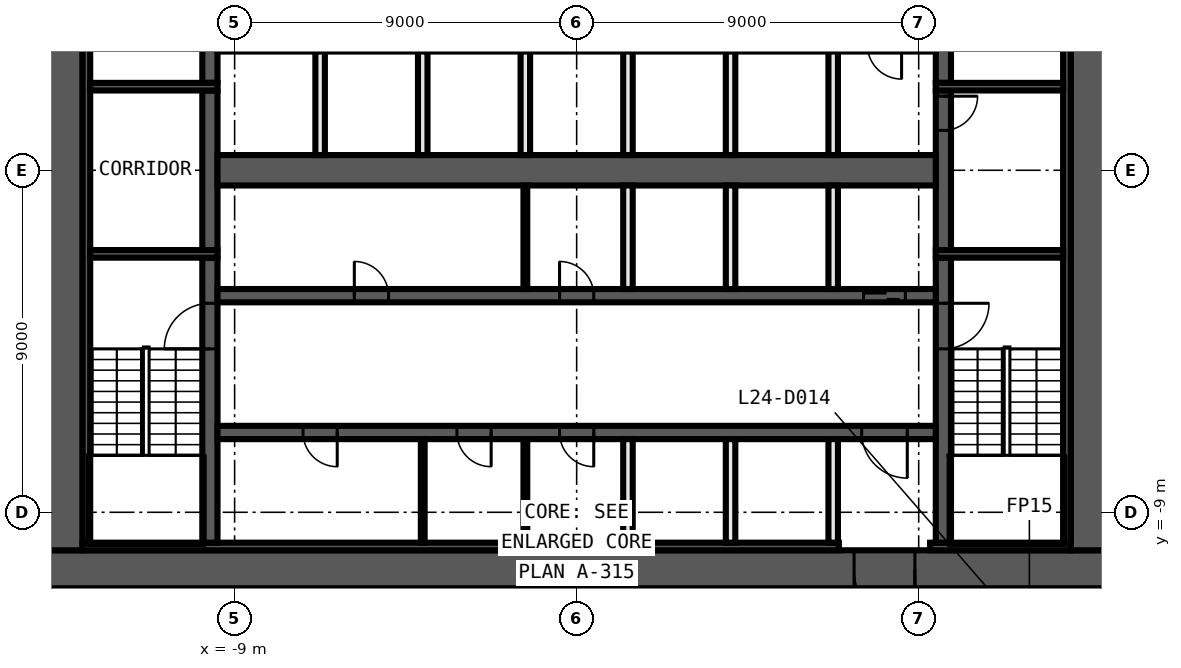
"""IFC4 building model, lengths in metres.
Left out: names, types, materials, properties, quantities, classifications, styles, units other than length and angle.
Written with IfcOpenShell. Run it as: python <this file> out.ifc"""

import sys

from ifc_helpers import new_model, si_unit, direction, frame, frame_2d, origin, place, context, subcontext, project, spatial, rectangle, extrude, element, fill, save


model = new_model("IFC4")
c1 = context("Model", 3, precision=1e-05, world=origin(), true_north=direction((0.0, 1.0)))
c2 = subcontext(c1, "Body", "Model", "MODEL_VIEW")
j1 = project(units=[si_unit("LENGTHUNIT", "METRE"), si_unit("PLANEANGLEUNIT", "RADIAN")], contexts=[c1])
p1 = place(None, origin())
s1 = spatial("IfcSite", under=j1, at=p1, CompositionType="ELEMENT")
p2 = place(p1, origin())
s2 = spatial("IfcBuilding", under=s1, at=p2, CompositionType="ELEMENT")
p3 = place(p2, frame((0.0, 0.0, 113.7)))
s3 = spatial("IfcBuildingStorey", under=s2, at=p3, CompositionType="ELEMENT", Elevation=113.7)
p4 = place(p3, frame((14.0, -10.5, 0.0), z_axis=(0.0, 0.0, 1.0), x_axis=(-1.0, 0.0, 0.0)))
e1 = element("IfcWall", 1, at=p4, inside=s3, PredefinedType="SHEAR", context=c2, shape_type="SweptSolid", body=[
    extrude(rectangle(XDim=28.0, YDim=1.0, at=frame_2d((14.0, 0.0))), origin(), (0.0, 0.0, 1.0), 3.3),
])
p5 = place(p4, frame((5.1, 0.0, 0.0)))
e2 = element("IfcOpeningElement", 2, at=p5, cuts=e1, PredefinedType="OPENING", context=c2, shape_type="SweptSolid", body=[
    extrude(rectangle(XDim=1.6, YDim=2.1, at=frame_2d((0.8, 1.05))), frame((0.0, 0.51, 0.0), z_axis=(0.0, -1.0, 0.0), x_axis=(1.0, 0.0, 0.0)), (0.0, 0.0, 1.0), 1.02),
])
for number, where, z_axis, x_axis in (
    (3, (13.5, 10.0, 0.0), (0.0, 0.0, 1.0), (0.0, -1.0, 0.0)),
    (4, (-13.5, -10.0, 0.0), (0.0, 0.0, 1.0), (0.0, 1.0, 0.0)),
):
    element("IfcWall", number, at=place(p3, frame(where, z_axis=z_axis, x_axis=x_axis)), inside=s3, PredefinedType="SHEAR", context=c2, shape_type="SweptSolid", body=[
        extrude(rectangle(XDim=20.0, YDim=1.0, at=frame_2d((10.0, 0.0))), origin(), (0.0, 0.0, 1.0), 3.3),
    ])
p6 = place(p3, frame((13.0, -9.9, 0.0), z_axis=(0.0, 0.0, 1.0), x_axis=(-1.0, 0.0, 0.0)))
e5 = element("IfcWall", 5, at=p6, inside=s3, PredefinedType="SHEAR", context=c2, shape_type="SweptSolid", body=[
    extrude(rectangle(XDim=3.7, YDim=0.2, at=frame_2d((1.85, 0.0))), origin(), (0.0, 0.0, 1.0), 3.3),
])
p7 = place(p3, frame((6.9, -9.9, 0.0), z_axis=(0.0, 0.0, 1.0), x_axis=(-1.0, 0.0, 0.0)))
e6 = element("IfcWall", 6, at=p7, inside=s3, PredefinedType="SHEAR", context=c2, shape_type="SweptSolid", body=[
    extrude(rectangle(XDim=19.9, YDim=0.2, at=frame_2d((9.95, 0.0))), origin(), (0.0, 0.0, 1.0), 3.3),
])
for number, where, z_axis, x_axis in (
    (7, (12.9, 9.8, 0.0), (0.0, 0.0, 1.0), (0.0, -1.0, 0.0)),
    (8, (-12.9, -9.8, 0.0), (0.0, 0.0, 1.0), (0.0, 1.0, 0.0)),
):
    element("IfcWall", number, at=place(p3, frame(where, z_axis=z_axis, x_axis=x_axis)), inside=s3, PredefinedType="SHEAR", context=c2, shape_type="SweptSolid", body=[
        extrude(rectangle(XDim=19.6, YDim=0.2, at=frame_2d((9.8, 0.0))), origin(), (0.0, 0.0, 1.0), 3.3),
    ])
p8 = place(p3, frame((9.65, -2.3, 0.0), z_axis=(0.0, 0.0, 1.0), x_axis=(0.0, -1.0, 0.0)))
e9 = element("IfcWall", 9, at=p8, inside=s3, PredefinedType="SHEAR", context=c2, shape_type="SweptSolid", body=[
    extrude(rectangle(XDim=7.5, YDim=0.4, at=frame_2d((3.75, 0.0))), origin(), (0.0, 0.0, 1.0), 3.3),
])
p9 = place(p8, frame((1.2, 0.0, 0.0)))
e10 = element("IfcOpeningElement", 10, at=p9, cuts=e9, PredefinedType="OPENING", context=c2, shape_type="SweptSolid", body=[
    extrude(rectangle(XDim=1.2, YDim=2.1, at=frame_2d((0.6, 1.05))), frame((0.0, 0.21, 0.0), z_axis=(0.0, -1.0, 0.0), x_axis=(1.0, 0.0, 0.0)), (0.0, 0.0, 1.0), 0.42),
])
p10 = place(p3, frame((9.65, 2.1, 0.0), z_axis=(0.0, 0.0, 1.0), x_axis=(0.0, -1.0, 0.0)))
e11 = element("IfcWall", 11, at=p10, inside=s3, PredefinedType="SHEAR", context=c2, shape_type="SweptSolid", body=[
    extrude(rectangle(XDim=4.2, YDim=0.4, at=frame_2d((2.1, 0.0))), origin(), (0.0, 0.0, 1.0), 3.3),
])
p11 = place(p10, frame((0.15, 0.0, 0.0)))
e12 = element("IfcOpeningElement", 12, at=p11, cuts=e11, PredefinedType="OPENING", context=c2, shape_type="SweptSolid", body=[
    extrude(rectangle(XDim=0.9, YDim=2.1, at=frame_2d((0.45, 1.05))), frame((0.0, 0.21, 0.0), z_axis=(0.0, -1.0, 0.0), x_axis=(1.0, 0.0, 0.0)), (0.0, 0.0, 1.0), 0.42),
])
p12 = place(p3, frame((9.65, 9.8, 0.0), z_axis=(0.0, 0.0, 1.0), x_axis=(0.0, -1.0, 0.0)))
e13 = element("IfcWall", 13, at=p12, inside=s3, PredefinedType="SHEAR", context=c2, shape_type="SweptSolid", body=[
    extrude(rectangle(XDim=7.5, YDim=0.4, at=frame_2d((3.75, 0.0))), origin(), (0.0, 0.0, 1.0), 3.3),
])
p13 = place(p12, frame((5.1, 0.0, 0.0)))
e14 = element("IfcOpeningElement", 14, at=p13, cuts=e13, PredefinedType="OPENING", context=c2, shape_type="SweptSolid", body=[
    extrude(rectangle(XDim=1.2, YDim=2.1, at=frame_2d((0.6, 1.05))), frame((0.0, 0.21, 0.0), z_axis=(0.0, -1.0, 0.0), x_axis=(1.0, 0.0, 0.0)), (0.0, 0.0, 1.0), 0.42),
])
p14 = place(p3, frame((-9.65, -9.8, 0.0), z_axis=(0.0, 0.0, 1.0), x_axis=(0.0, 1.0, 0.0)))
e15 = element("IfcWall", 15, at=p14, inside=s3, PredefinedType="SHEAR", context=c2, shape_type="SweptSolid", body=[
    extrude(rectangle(XDim=7.5, YDim=0.4, at=frame_2d((3.75, 0.0))), origin(), (0.0, 0.0, 1.0), 3.3),
])
p15 = place(p14, frame((5.1, 0.0, 0.0)))
e16 = element("IfcOpeningElement", 16, at=p15, cuts=e15, PredefinedType="OPENING", context=c2, shape_type="SweptSolid", body=[
    extrude(rectangle(XDim=1.2, YDim=2.1, at=frame_2d((0.6, 1.05))), frame((0.0, 0.21, 0.0), z_axis=(0.0, -1.0, 0.0), x_axis=(1.0, 0.0, 0.0)), (0.0, 0.0, 1.0), 0.42),
])
p16 = place(p3, frame((-9.65, -2.1, 0.0), z_axis=(0.0, 0.0, 1.0), x_axis=(0.0, 1.0, 0.0)))
e17 = element("IfcWall", 17, at=p16, inside=s3, PredefinedType="SHEAR", context=c2, shape_type="SweptSolid", body=[
    extrude(rectangle(XDim=4.2, YDim=0.4, at=frame_2d((2.1, 0.0))), origin(), (0.0, 0.0, 1.0), 3.3),
])
p17 = place(p3, frame((-9.65, 2.3, 0.0), z_axis=(0.0, 0.0, 1.0), x_axis=(0.0, 1.0, 0.0)))
e18 = element("IfcWall", 18, at=p17, inside=s3, PredefinedType="SHEAR", context=c2, shape_type="SweptSolid", body=[
    extrude(rectangle(XDim=7.5, YDim=0.4, at=frame_2d((3.75, 0.0))), origin(), (0.0, 0.0, 1.0), 3.3),
])
p18 = place(p17, frame((1.2, 0.0, 0.0)))
e19 = element("IfcOpeningElement", 19, at=p18, cuts=e18, PredefinedType="OPENING", context=c2, shape_type="SweptSolid", body=[
    extrude(rectangle(XDim=1.2, YDim=2.1, at=frame_2d((0.6, 1.05))), frame((0.0, 0.21, 0.0), z_axis=(0.0, -1.0, 0.0), x_axis=(1.0, 0.0, 0.0)), (0.0, 0.0, 1.0), 0.42),
])
for number, where, z_axis, x_axis in (
    (20, (9.45, 2.2, 0.0), (0.0, 0.0, 1.0), (1.0, 0.0, 0.0)),
    (21, (-9.45, 2.2, 0.0), (0.0, 0.0, 1.0), (-1.0, 0.0, 0.0)),
    (22, (9.45, -2.2, 0.0), (0.0, 0.0, 1.0), (1.0, 0.0, 0.0)),
    (23, (-9.45, -2.2, 0.0), (0.0, 0.0, 1.0), (-1.0, 0.0, 0.0)),
):
    element("IfcWall", number, at=place(p3, frame(where, z_axis=z_axis, x_axis=x_axis)), inside=s3, PredefinedType="SHEAR", context=c2, shape_type="SweptSolid", body=[
        extrude(rectangle(XDim=3.35, YDim=0.2, at=frame_2d((1.675, 0.0))), origin(), (0.0, 0.0, 1.0), 3.3),
    ])
p19 = place(p3, frame((-9.45, -3.3, 0.0), z_axis=(0.0, 0.0, 1.0), x_axis=(1.0, 0.0, 0.0)))
e24 = element("IfcWall", 24, at=p19, inside=s3, PredefinedType="SHEAR", context=c2, shape_type="SweptSolid", body=[
    extrude(rectangle(XDim=18.9, YDim=0.35, at=frame_2d((9.45, 0.0))), origin(), (0.0, 0.0, 1.0), 3.3),
])
p20 = place(p19, frame((17.0, 0.0, 0.0)))
e25 = element("IfcOpeningElement", 25, at=p20, cuts=e24, PredefinedType="OPENING", context=c2, shape_type="SweptSolid", body=[
    extrude(rectangle(XDim=1.1, YDim=2.1, at=frame_2d((0.55, 1.05))), frame((0.0, 0.185, 0.0), z_axis=(0.0, -1.0, 0.0), x_axis=(1.0, 0.0, 0.0)), (0.0, 0.0, 1.0), 0.37),
])
p21 = place(p19, frame((3.6, 0.0, 0.0)))
e26 = element("IfcOpeningElement", 26, at=p21, cuts=e24, PredefinedType="OPENING", context=c2, shape_type="SweptSolid", body=[
    extrude(rectangle(XDim=0.9, YDim=2.1, at=frame_2d((0.45, 1.05))), frame((0.0, 0.185, 0.0), z_axis=(0.0, -1.0, 0.0), x_axis=(1.0, 0.0, 0.0)), (0.0, 0.0, 1.0), 0.37),
])
p22 = place(p19, frame((9.0, 0.0, 0.0)))
e27 = element("IfcOpeningElement", 27, at=p22, cuts=e24, PredefinedType="OPENING", context=c2, shape_type="SweptSolid", body=[
    extrude(rectangle(XDim=0.9, YDim=2.1, at=frame_2d((0.45, 1.05))), frame((0.0, 0.185, 0.0), z_axis=(0.0, -1.0, 0.0), x_axis=(1.0, 0.0, 0.0)), (0.0, 0.0, 1.0), 0.37),
])
p23 = place(p3, frame((9.45, -6.9, 0.0), z_axis=(0.0, 0.0, 1.0), x_axis=(-1.0, 0.0, 0.0)))
e28 = element("IfcWall", 28, at=p23, inside=s3, PredefinedType="SHEAR", context=c2, shape_type="SweptSolid", body=[
    extrude(rectangle(XDim=18.9, YDim=0.35, at=frame_2d((9.45, 0.0))), origin(), (0.0, 0.0, 1.0), 3.3),
])
p24 = place(p23, frame((0.75, 0.0, 0.0)))
e29 = element("IfcOpeningElement", 29, at=p24, cuts=e28, PredefinedType="OPENING", context=c2, shape_type="SweptSolid", body=[
    extrude(rectangle(XDim=1.2, YDim=2.1, at=frame_2d((0.6, 1.05))), frame((0.0, 0.185, 0.0), z_axis=(0.0, -1.0, 0.0), x_axis=(1.0, 0.0, 0.0)), (0.0, 0.0, 1.0), 0.37),
])
p25 = place(p23, frame((15.75, 0.0, 0.0)))
e30 = element("IfcOpeningElement", 30, at=p25, cuts=e28, PredefinedType="OPENING", context=c2, shape_type="SweptSolid", body=[
    extrude(rectangle(XDim=0.9, YDim=2.1, at=frame_2d((0.45, 1.05))), frame((0.0, 0.185, 0.0), z_axis=(0.0, -1.0, 0.0), x_axis=(1.0, 0.0, 0.0)), (0.0, 0.0, 1.0), 0.37),
])
p26 = place(p23, frame((11.7, 0.0, 0.0)))
e31 = element("IfcOpeningElement", 31, at=p26, cuts=e28, PredefinedType="OPENING", context=c2, shape_type="SweptSolid", body=[
    extrude(rectangle(XDim=0.9, YDim=2.1, at=frame_2d((0.45, 1.05))), frame((0.0, 0.185, 0.0), z_axis=(0.0, -1.0, 0.0), x_axis=(1.0, 0.0, 0.0)), (0.0, 0.0, 1.0), 0.37),
])
p27 = place(p23, frame((9.0, 0.0, 0.0)))
e32 = element("IfcOpeningElement", 32, at=p27, cuts=e28, PredefinedType="OPENING", context=c2, shape_type="SweptSolid", body=[
    extrude(rectangle(XDim=0.9, YDim=2.1, at=frame_2d((0.45, 1.05))), frame((0.0, 0.185, 0.0), z_axis=(0.0, -1.0, 0.0), x_axis=(1.0, 0.0, 0.0)), (0.0, 0.0, 1.0), 0.37),
])
p28 = place(p3, frame((-9.45, 0.0, 0.0), z_axis=(0.0, 0.0, 1.0), x_axis=(1.0, 0.0, 0.0)))
e33 = element("IfcWall", 33, at=p28, inside=s3, PredefinedType="SHEAR", context=c2, shape_type="SweptSolid", body=[
    extrude(rectangle(XDim=18.9, YDim=0.8, at=frame_2d((9.45, 0.0))), origin(), (0.0, 0.0, 1.0), 3.3),
])
for number, where, z_axis, x_axis in (
    (34, (6.75, -9.8, 0.0), (0.0, 0.0, 1.0), (0.0, 1.0, 0.0)),
    (35, (6.75, -3.125, 0.0), (0.0, 0.0, 1.0), (0.0, 1.0, 0.0)),
    (36, (6.75, 0.4, 0.0), (0.0, 0.0, 1.0), (0.0, 1.0, 0.0)),
    (37, (4.05, -9.8, 0.0), (0.0, 0.0, 1.0), (0.0, 1.0, 0.0)),
    (38, (4.05, -3.125, 0.0), (0.0, 0.0, 1.0), (0.0, 1.0, 0.0)),
    (39, (4.05, 0.4, 0.0), (0.0, 0.0, 1.0), (0.0, 1.0, 0.0)),
    (40, (1.35, -9.8, 0.0), (0.0, 0.0, 1.0), (0.0, 1.0, 0.0)),
    (41, (1.35, -3.125, 0.0), (0.0, 0.0, 1.0), (0.0, 1.0, 0.0)),
    (42, (1.35, 0.4, 0.0), (0.0, 0.0, 1.0), (0.0, 1.0, 0.0)),
):
    element("IfcWall", number, at=place(p3, frame(where, z_axis=z_axis, x_axis=x_axis)), inside=s3, PredefinedType="SOLIDWALL", context=c2, shape_type="SweptSolid", body=[
        extrude(rectangle(XDim=2.725, YDim=0.25, at=frame_2d((1.363, 0.0))), origin(), (0.0, 0.0, 1.0), 3.3),
    ])
for number, where, z_axis, x_axis in (
    (43, (-1.35, -9.8, 0.0), (0.0, 0.0, 1.0), (0.0, 1.0, 0.0)),
    (44, (-1.35, -3.125, 0.0), (0.0, 0.0, 1.0), (0.0, 1.0, 0.0)),
):
    element("IfcWall", number, at=place(p3, frame(where, z_axis=z_axis, x_axis=x_axis)), inside=s3, PredefinedType="PARTITIONING", context=c2, shape_type="SweptSolid", body=[
        extrude(rectangle(XDim=2.725, YDim=0.1, at=frame_2d((1.363, 0.0))), origin(), (0.0, 0.0, 1.0), 3.3),
    ])
p29 = place(p3, frame((-1.35, 0.4, 0.0), z_axis=(0.0, 0.0, 1.0), x_axis=(0.0, 1.0, 0.0)))
e45 = element("IfcWall", 45, at=p29, inside=s3, PredefinedType="SOLIDWALL", context=c2, shape_type="SweptSolid", body=[
    extrude(rectangle(XDim=2.725, YDim=0.25, at=frame_2d((1.363, 0.0))), origin(), (0.0, 0.0, 1.0), 3.3),
])
p30 = place(p3, frame((-4.05, -9.8, 0.0), z_axis=(0.0, 0.0, 1.0), x_axis=(0.0, 1.0, 0.0)))
e46 = element("IfcWall", 46, at=p30, inside=s3, PredefinedType="PARTITIONING", context=c2, shape_type="SweptSolid", body=[
    extrude(rectangle(XDim=2.725, YDim=0.1, at=frame_2d((1.363, 0.0))), origin(), (0.0, 0.0, 1.0), 3.3),
])
for number, where, z_axis, x_axis in (
    (47, (-4.05, 0.4, 0.0), (0.0, 0.0, 1.0), (0.0, 1.0, 0.0)),
    (48, (-6.75, 0.4, 0.0), (0.0, 0.0, 1.0), (0.0, 1.0, 0.0)),
):
    element("IfcWall", number, at=place(p3, frame(where, z_axis=z_axis, x_axis=x_axis)), inside=s3, PredefinedType="SOLIDWALL", context=c2, shape_type="SweptSolid", body=[
        extrude(rectangle(XDim=2.725, YDim=0.25, at=frame_2d((1.363, 0.0))), origin(), (0.0, 0.0, 1.0), 3.3),
    ])
p31 = place(p11, origin())
e49 = element("IfcDoor", 49, at=p31, inside=s3, OperationType="SINGLE_SWING_RIGHT", PredefinedType="DOOR", context=c2, shape_type="SweptSolid", body=[
    extrude(rectangle(XDim=0.9, YDim=2.1, at=frame_2d((0.45, 1.05))), frame((0.0, 0.025, 0.0), z_axis=(0.0, -1.0, 0.0), x_axis=(1.0, 0.0, 0.0)), (0.0, 0.0, 1.0), 0.05),
])
fill(e12, e49)
p32 = place(p20, origin())
e50 = element("IfcDoor", 50, at=p32, inside=s3, OperationType="DOUBLE_DOOR_SLIDING", PredefinedType="DOOR", context=c2, shape_type="SweptSolid", body=[
    extrude(rectangle(XDim=1.1, YDim=2.1, at=frame_2d((0.55, 1.05))), frame((0.0, 0.025, 0.0), z_axis=(0.0, -1.0, 0.0), x_axis=(1.0, 0.0, 0.0)), (0.0, 0.0, 1.0), 0.05),
])
fill(e25, e50)
p33 = place(p5, origin())
e51 = element("IfcDoor", 51, at=p33, inside=s3, OperationType="DOUBLE_DOOR_SINGLE_SWING", PredefinedType="DOOR", context=c2, shape_type="SweptSolid", body=[
    extrude(rectangle(XDim=1.6, YDim=2.1, at=frame_2d((0.8, 1.05))), frame((0.0, 0.025, 0.0), z_axis=(0.0, -1.0, 0.0), x_axis=(1.0, 0.0, 0.0)), (0.0, 0.0, 1.0), 0.05),
])
fill(e2, e51)
p34 = place(p24, origin())
e52 = element("IfcDoor", 52, at=p34, inside=s3, OperationType="SINGLE_SWING_LEFT", PredefinedType="DOOR", context=c2, shape_type="SweptSolid", body=[
    extrude(rectangle(XDim=1.2, YDim=2.1, at=frame_2d((0.6, 1.05))), frame((0.0, 0.025, 0.0), z_axis=(0.0, -1.0, 0.0), x_axis=(1.0, 0.0, 0.0)), (0.0, 0.0, 1.0), 0.05),
])
fill(e29, e52)
p35 = place(p21, origin())
e53 = element("IfcDoor", 53, at=p35, inside=s3, OperationType="SINGLE_SWING_RIGHT", PredefinedType="DOOR", context=c2, shape_type="SweptSolid", body=[
    extrude(rectangle(XDim=0.9, YDim=2.1, at=frame_2d((0.45, 1.05))), frame((0.0, 0.025, 0.0), z_axis=(0.0, -1.0, 0.0), x_axis=(1.0, 0.0, 0.0)), (0.0, 0.0, 1.0), 0.05),
])
fill(e26, e53)
p36 = place(p22, origin())
e54 = element("IfcDoor", 54, at=p36, inside=s3, OperationType="SINGLE_SWING_LEFT", PredefinedType="DOOR", context=c2, shape_type="SweptSolid", body=[
    extrude(rectangle(XDim=0.9, YDim=2.1, at=frame_2d((0.45, 1.05))), frame((0.0, 0.025, 0.0), z_axis=(0.0, -1.0, 0.0), x_axis=(1.0, 0.0, 0.0)), (0.0, 0.0, 1.0), 0.05),
])
fill(e27, e54)
p37 = place(p25, origin())
e55 = element("IfcDoor", 55, at=p37, inside=s3, OperationType="SINGLE_SWING_RIGHT", PredefinedType="DOOR", context=c2, shape_type="SweptSolid", body=[
    extrude(rectangle(XDim=0.9, YDim=2.1, at=frame_2d((0.45, 1.05))), frame((0.0, 0.025, 0.0), z_axis=(0.0, -1.0, 0.0), x_axis=(1.0, 0.0, 0.0)), (0.0, 0.0, 1.0), 0.05),
])
fill(e30, e55)
p38 = place(p26, origin())
e56 = element("IfcDoor", 56, at=p38, inside=s3, OperationType="SINGLE_SWING_LEFT", PredefinedType="DOOR", context=c2, shape_type="SweptSolid", body=[
    extrude(rectangle(XDim=0.9, YDim=2.1, at=frame_2d((0.45, 1.05))), frame((0.0, 0.025, 0.0), z_axis=(0.0, -1.0, 0.0), x_axis=(1.0, 0.0, 0.0)), (0.0, 0.0, 1.0), 0.05),
])
fill(e31, e56)
p39 = place(p27, origin())
e57 = element("IfcDoor", 57, at=p39, inside=s3, OperationType="SINGLE_SWING_RIGHT", PredefinedType="DOOR", context=c2, shape_type="SweptSolid", body=[
    extrude(rectangle(XDim=0.9, YDim=2.1, at=frame_2d((0.45, 1.05))), frame((0.0, 0.025, 0.0), z_axis=(0.0, -1.0, 0.0), x_axis=(1.0, 0.0, 0.0)), (0.0, 0.0, 1.0), 0.05),
])
fill(e32, e57)
p40 = place(p9, origin())
e58 = element("IfcDoor", 58, at=p40, inside=s3, OperationType="SINGLE_SWING_RIGHT", PredefinedType="DOOR", context=c2, shape_type="SweptSolid", body=[
    extrude(rectangle(XDim=1.2, YDim=2.1, at=frame_2d((0.6, 1.05))), frame((0.0, 0.025, 0.0), z_axis=(0.0, -1.0, 0.0), x_axis=(1.0, 0.0, 0.0)), (0.0, 0.0, 1.0), 0.05),
])
fill(e10, e58)
p41 = place(p15, origin())
e59 = element("IfcDoor", 59, at=p41, inside=s3, OperationType="SINGLE_SWING_LEFT", PredefinedType="DOOR", context=c2, shape_type="SweptSolid", body=[
    extrude(rectangle(XDim=1.2, YDim=2.1, at=frame_2d((0.6, 1.05))), frame((0.0, 0.025, 0.0), z_axis=(0.0, -1.0, 0.0), x_axis=(1.0, 0.0, 0.0)), (0.0, 0.0, 1.0), 0.05),
])
fill(e16, e59)
save(model, sys.argv[1])
